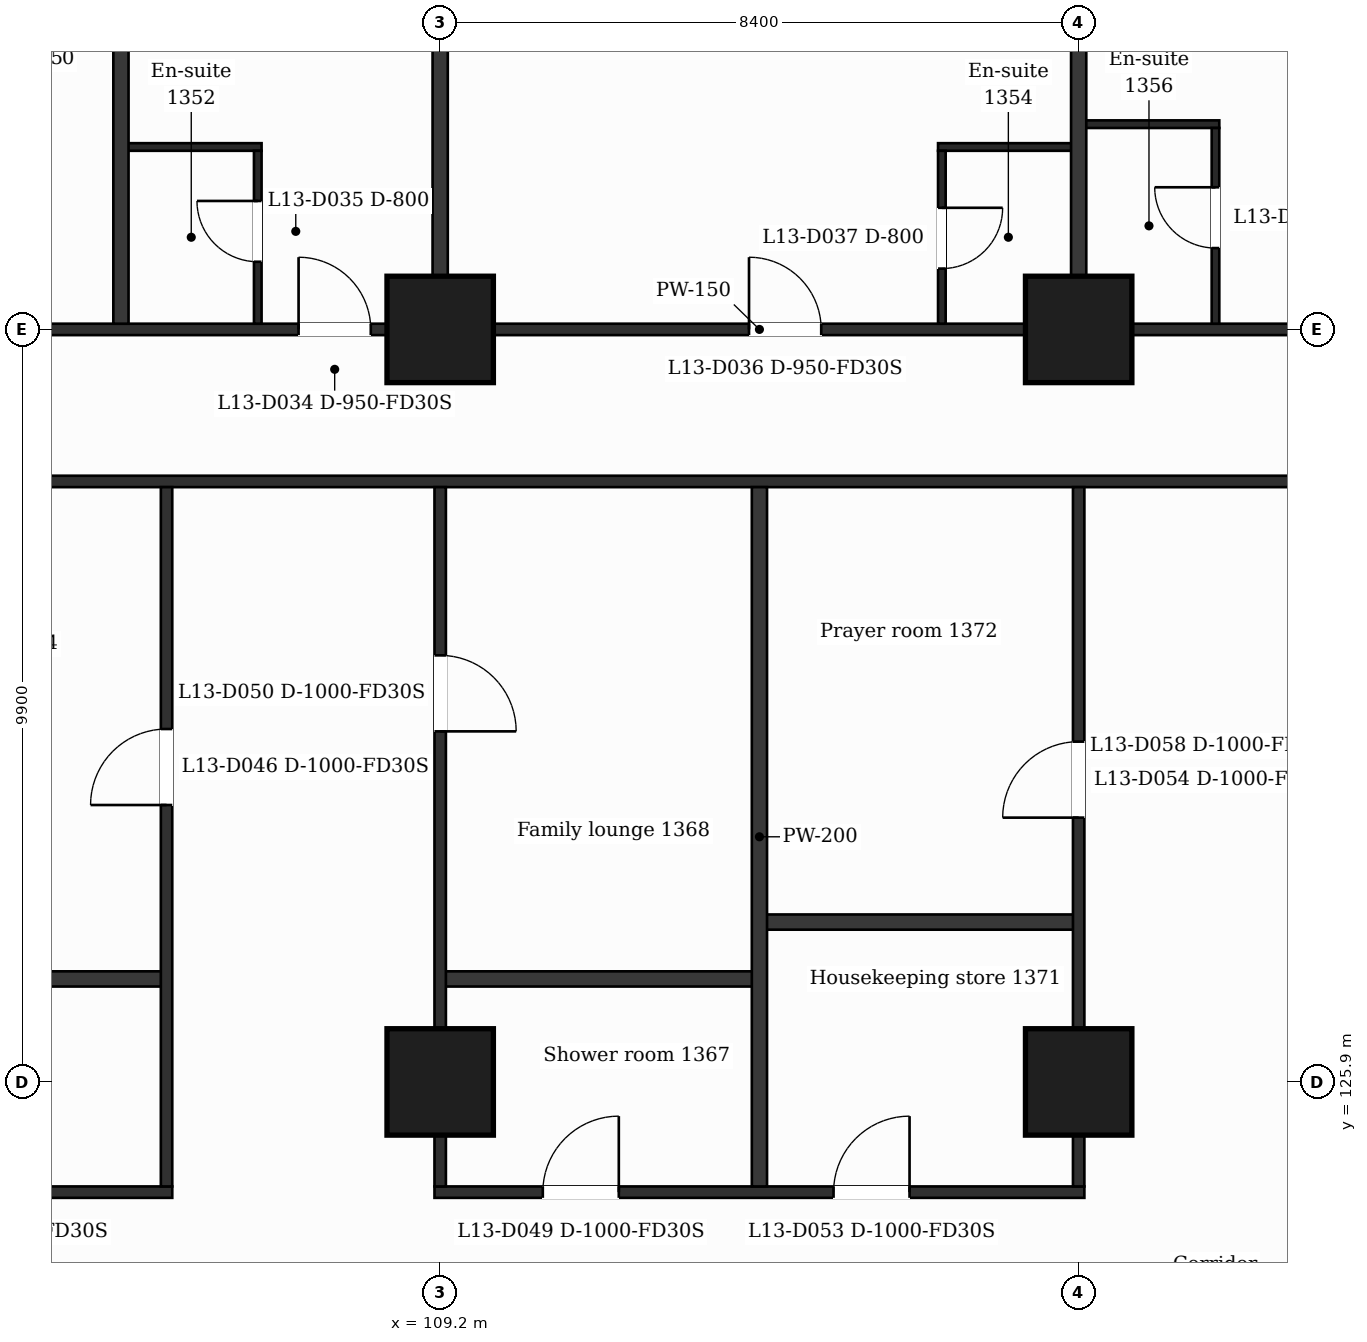
"""IFC4 building model, lengths in metres.
Left out: names, types, materials, properties, quantities, classifications, styles, units other than length and angle.
Written with IfcOpenShell. Run it as: python <this file> out.ifc"""

import sys

from ifc_helpers import new_model, si_unit, direction, frame, frame_2d, origin, origin_2d, place, context, subcontext, project, spatial, rectangle, extrude, element, fill, save


model = new_model("IFC4")
c1 = context("Model", 3, precision=1e-05, world=origin(), true_north=direction((0.0, 1.0)))
c2 = subcontext(c1, "Body", "Model", "MODEL_VIEW")
j1 = project(units=[si_unit("LENGTHUNIT", "METRE"), si_unit("PLANEANGLEUNIT", "RADIAN")], contexts=[c1])
p1 = place(None, origin())
s1 = spatial("IfcSite", under=j1, at=p1, CompositionType="ELEMENT")
p2 = place(p1, origin())
s2 = spatial("IfcBuilding", under=s1, at=p2, CompositionType="ELEMENT")
p3 = place(p2, frame((0.0, 0.0, 63.5)))
s3 = spatial("IfcBuildingStorey", under=s2, at=p3, CompositionType="ELEMENT", Elevation=63.5)
for number, where, z_axis, x_axis in (
    (1, (109.2, 125.9, 0.0), (0.0, 0.0, 1.0), (1.0, 0.0, 0.0)),
    (2, (117.6, 125.9, 0.0), (0.0, 0.0, 1.0), (1.0, 0.0, 0.0)),
    (3, (109.2, 135.8, 0.0), (0.0, 0.0, 1.0), (1.0, 0.0, 0.0)),
    (4, (117.6, 135.8, 0.0), (0.0, 0.0, 1.0), (1.0, 0.0, 0.0)),
):
    element("IfcColumn", number, at=place(p3, frame(where, z_axis=z_axis, x_axis=x_axis)), inside=s3, PredefinedType="COLUMN", context=c2, shape_type="SweptSolid", body=[
        extrude(rectangle(XDim=1.4, YDim=1.4, at=origin_2d()), origin(), (0.0, 0.0, 1.0), 3.5),
    ])
p4 = place(p3, frame((100.8, 124.45, 0.0), z_axis=(0.0, 0.0, 1.0), x_axis=(1.0, 0.0, 0.0)))
e5 = element("IfcWall", 5, at=p4, inside=s3, PredefinedType="PARTITIONING", context=c2, shape_type="SweptSolid", body=[
    extrude(rectangle(XDim=4.875, YDim=0.15, at=frame_2d((2.438, 0.0))), origin(), (0.0, 0.0, 1.0), 3.18),
])
p5 = place(p4, frame((1.9, 0.0, 0.0)))
e6 = element("IfcOpeningElement", 6, at=p5, cuts=e5, PredefinedType="OPENING", context=c2, shape_type="SweptSolid", body=[
    extrude(rectangle(XDim=1.0, YDim=2.1, at=frame_2d((0.5, 1.05))), frame((0.0, 0.085, 0.0), z_axis=(0.0, -1.0, 0.0), x_axis=(1.0, 0.0, 0.0)), (0.0, 0.0, 1.0), 0.17),
])
p6 = place(p3, frame((109.125, 124.45, 0.0), z_axis=(0.0, 0.0, 1.0), x_axis=(1.0, 0.0, 0.0)))
e7 = element("IfcWall", 7, at=p6, inside=s3, PredefinedType="PARTITIONING", context=c2, shape_type="SweptSolid", body=[
    extrude(rectangle(XDim=8.55, YDim=0.15, at=frame_2d((4.275, 0.0))), origin(), (0.0, 0.0, 1.0), 3.18),
])
p7 = place(p6, frame((1.425, 0.0, 0.0)))
e8 = element("IfcOpeningElement", 8, at=p7, cuts=e7, PredefinedType="OPENING", context=c2, shape_type="SweptSolid", body=[
    extrude(rectangle(XDim=1.0, YDim=2.1, at=frame_2d((0.5, 1.05))), frame((0.0, 0.085, 0.0), z_axis=(0.0, -1.0, 0.0), x_axis=(1.0, 0.0, 0.0)), (0.0, 0.0, 1.0), 0.17),
])
p8 = place(p6, frame((5.25, 0.0, 0.0)))
e9 = element("IfcOpeningElement", 9, at=p8, cuts=e7, PredefinedType="OPENING", context=c2, shape_type="SweptSolid", body=[
    extrude(rectangle(XDim=1.0, YDim=2.1, at=frame_2d((0.5, 1.05))), frame((0.0, 0.085, 0.0), z_axis=(0.0, -1.0, 0.0), x_axis=(1.0, 0.0, 0.0)), (0.0, 0.0, 1.0), 0.17),
])
p9 = place(p3, frame((100.8, 127.255, 0.0), z_axis=(0.0, 0.0, 1.0), x_axis=(1.0, 0.0, 0.0)))
e10 = element("IfcWall", 10, at=p9, inside=s3, PredefinedType="PARTITIONING", context=c2, shape_type="SweptSolid", body=[
    extrude(rectangle(XDim=4.8, YDim=0.2, at=frame_2d((2.4, 0.0))), origin(), (0.0, 0.0, 1.0), 3.18),
])
p10 = place(p3, frame((109.2, 127.255, 0.0), z_axis=(0.0, 0.0, 1.0), x_axis=(1.0, 0.0, 0.0)))
e11 = element("IfcWall", 11, at=p10, inside=s3, PredefinedType="PARTITIONING", context=c2, shape_type="SweptSolid", body=[
    extrude(rectangle(XDim=4.2, YDim=0.2, at=frame_2d((2.1, 0.0))), origin(), (0.0, 0.0, 1.0), 3.18),
])
p11 = place(p3, frame((113.4, 128.003, 0.0), z_axis=(0.0, 0.0, 1.0), x_axis=(1.0, 0.0, 0.0)))
e12 = element("IfcWall", 12, at=p11, inside=s3, PredefinedType="PARTITIONING", context=c2, shape_type="SweptSolid", body=[
    extrude(rectangle(XDim=4.2, YDim=0.2, at=frame_2d((2.1, 0.0))), origin(), (0.0, 0.0, 1.0), 3.18),
])
p12 = place(p3, frame((100.725, 133.8, 0.0), z_axis=(0.0, 0.0, 1.0), x_axis=(1.0, 0.0, 0.0)))
e13 = element("IfcWall", 13, at=p12, inside=s3, PredefinedType="PARTITIONING", context=c2, shape_type="SweptSolid", body=[
    extrude(rectangle(XDim=25.35, YDim=0.15, at=frame_2d((12.675, 0.0))), origin(), (0.0, 0.0, 1.0), 3.18),
])
p13 = place(p3, frame((90.895, 135.8, 0.0), z_axis=(0.0, 0.0, 1.0), x_axis=(1.0, 0.0, 0.0)))
e14 = element("IfcWall", 14, at=p13, inside=s3, PredefinedType="PARTITIONING", context=c2, shape_type="SweptSolid", body=[
    extrude(rectangle(XDim=45.011, YDim=0.15, at=frame_2d((22.505, 0.0))), origin(), (0.0, 0.0, 1.0), 3.18),
])
p14 = place(p13, frame((7.675, 0.0, 0.0)))
e15 = element("IfcOpeningElement", 15, at=p14, cuts=e14, PredefinedType="OPENING", context=c2, shape_type="SweptSolid", body=[
    extrude(rectangle(XDim=1.0, YDim=2.1, at=frame_2d((0.5, 1.05))), frame((0.0, 0.085, 0.0), z_axis=(0.0, -1.0, 0.0), x_axis=(1.0, 0.0, 0.0)), (0.0, 0.0, 1.0), 0.17),
])
p15 = place(p13, frame((10.892, 0.0, 0.0)))
e16 = element("IfcOpeningElement", 16, at=p15, cuts=e14, PredefinedType="OPENING", context=c2, shape_type="SweptSolid", body=[
    extrude(rectangle(XDim=0.95, YDim=2.1, at=frame_2d((0.475, 1.05))), frame((0.0, 0.085, 0.0), z_axis=(0.0, -1.0, 0.0), x_axis=(1.0, 0.0, 0.0)), (0.0, 0.0, 1.0), 0.17),
])
p16 = place(p13, frame((16.442, 0.0, 0.0)))
e17 = element("IfcOpeningElement", 17, at=p16, cuts=e14, PredefinedType="OPENING", context=c2, shape_type="SweptSolid", body=[
    extrude(rectangle(XDim=0.95, YDim=2.1, at=frame_2d((0.475, 1.05))), frame((0.0, 0.085, 0.0), z_axis=(0.0, -1.0, 0.0), x_axis=(1.0, 0.0, 0.0)), (0.0, 0.0, 1.0), 0.17),
])
p17 = place(p13, frame((22.368, 0.0, 0.0)))
e18 = element("IfcOpeningElement", 18, at=p17, cuts=e14, PredefinedType="OPENING", context=c2, shape_type="SweptSolid", body=[
    extrude(rectangle(XDim=0.95, YDim=2.1, at=frame_2d((0.475, 1.05))), frame((0.0, 0.085, 0.0), z_axis=(0.0, -1.0, 0.0), x_axis=(1.0, 0.0, 0.0)), (0.0, 0.0, 1.0), 0.17),
])
p18 = place(p13, frame((31.825, 0.0, 0.0)))
e19 = element("IfcOpeningElement", 19, at=p18, cuts=e14, PredefinedType="OPENING", context=c2, shape_type="SweptSolid", body=[
    extrude(rectangle(XDim=0.95, YDim=2.1, at=frame_2d((0.475, 1.05))), frame((0.0, 0.085, 0.0), z_axis=(0.0, -1.0, 0.0), x_axis=(1.0, 0.0, 0.0)), (0.0, 0.0, 1.0), 0.17),
])
p19 = place(p13, frame((36.775, 0.0, 0.0)))
e20 = element("IfcOpeningElement", 20, at=p19, cuts=e14, PredefinedType="OPENING", context=c2, shape_type="SweptSolid", body=[
    extrude(rectangle(XDim=1.0, YDim=2.1, at=frame_2d((0.5, 1.05))), frame((0.0, 0.085, 0.0), z_axis=(0.0, -1.0, 0.0), x_axis=(1.0, 0.0, 0.0)), (0.0, 0.0, 1.0), 0.17),
])
for number, where, z_axis, x_axis in (
    (21, (105.0, 138.2, 0.0), (0.0, 0.0, 1.0), (1.0, 0.0, 0.0)),
    (22, (115.75, 138.2, 0.0), (0.0, 0.0, 1.0), (1.0, 0.0, 0.0)),
):
    element("IfcWall", number, at=place(p3, frame(where, z_axis=z_axis, x_axis=x_axis)), inside=s3, PredefinedType="PARTITIONING", context=c2, shape_type="SweptSolid", body=[
        extrude(rectangle(XDim=1.85, YDim=0.1, at=frame_2d((0.925, 0.0))), origin(), (0.0, 0.0, 1.0), 3.18),
    ])
p20 = place(p3, frame((117.6, 138.5, 0.0), z_axis=(0.0, 0.0, 1.0), x_axis=(1.0, 0.0, 0.0)))
e23 = element("IfcWall", 23, at=p20, inside=s3, PredefinedType="PARTITIONING", context=c2, shape_type="SweptSolid", body=[
    extrude(rectangle(XDim=1.85, YDim=0.1, at=frame_2d((0.925, 0.0))), origin(), (0.0, 0.0, 1.0), 3.18),
])
p21 = place(p3, frame((105.0, 135.875, 0.0), z_axis=(0.0, 0.0, 1.0), x_axis=(0.0, 1.0, 0.0)))
e24 = element("IfcWall", 24, at=p21, inside=s3, PredefinedType="PARTITIONING", context=c2, shape_type="SweptSolid", body=[
    extrude(rectangle(XDim=7.135, YDim=0.2, at=frame_2d((3.567, 0.0))), origin(), (0.0, 0.0, 1.0), 3.18),
])
p22 = place(p3, frame((105.6, 124.525, 0.0), z_axis=(0.0, 0.0, 1.0), x_axis=(0.0, 1.0, 0.0)))
e25 = element("IfcWall", 25, at=p22, inside=s3, PredefinedType="PARTITIONING", context=c2, shape_type="SweptSolid", body=[
    extrude(rectangle(XDim=9.2, YDim=0.15, at=frame_2d((4.6, 0.0))), origin(), (0.0, 0.0, 1.0), 3.18),
])
p23 = place(p22, frame((5.018, 0.0, 0.0)))
e26 = element("IfcOpeningElement", 26, at=p23, cuts=e25, PredefinedType="OPENING", context=c2, shape_type="SweptSolid", body=[
    extrude(rectangle(XDim=1.0, YDim=2.1, at=frame_2d((0.5, 1.05))), frame((0.0, 0.085, 0.0), z_axis=(0.0, -1.0, 0.0), x_axis=(1.0, 0.0, 0.0)), (0.0, 0.0, 1.0), 0.17),
])
p24 = place(p3, frame((106.8, 135.875, 0.0), z_axis=(0.0, 0.0, 1.0), x_axis=(0.0, 1.0, 0.0)))
e27 = element("IfcWall", 27, at=p24, inside=s3, PredefinedType="PARTITIONING", context=c2, shape_type="SweptSolid", body=[
    extrude(rectangle(XDim=2.275, YDim=0.1, at=frame_2d((1.137, 0.0))), origin(), (0.0, 0.0, 1.0), 3.18),
])
p25 = place(p24, frame((0.815, 0.0, 0.0)))
e28 = element("IfcOpeningElement", 28, at=p25, cuts=e27, PredefinedType="OPENING", context=c2, shape_type="SweptSolid", body=[
    extrude(rectangle(XDim=0.8, YDim=2.1, at=frame_2d((0.4, 1.05))), frame((0.0, 0.06, 0.0), z_axis=(0.0, -1.0, 0.0), x_axis=(1.0, 0.0, 0.0)), (0.0, 0.0, 1.0), 0.12),
])
p26 = place(p3, frame((109.2, 135.875, 0.0), z_axis=(0.0, 0.0, 1.0), x_axis=(0.0, 1.0, 0.0)))
e29 = element("IfcWall", 29, at=p26, inside=s3, PredefinedType="PARTITIONING", context=c2, shape_type="SweptSolid", body=[
    extrude(rectangle(XDim=7.135, YDim=0.2, at=frame_2d((3.567, 0.0))), origin(), (0.0, 0.0, 1.0), 3.18),
])
p27 = place(p3, frame((109.2, 124.525, 0.0), z_axis=(0.0, 0.0, 1.0), x_axis=(0.0, 1.0, 0.0)))
e30 = element("IfcWall", 30, at=p27, inside=s3, PredefinedType="PARTITIONING", context=c2, shape_type="SweptSolid", body=[
    extrude(rectangle(XDim=9.2, YDim=0.15, at=frame_2d((4.6, 0.0))), origin(), (0.0, 0.0, 1.0), 3.18),
])
p28 = place(p27, frame((5.987, 0.0, 0.0)))
e31 = element("IfcOpeningElement", 31, at=p28, cuts=e30, PredefinedType="OPENING", context=c2, shape_type="SweptSolid", body=[
    extrude(rectangle(XDim=1.0, YDim=2.1, at=frame_2d((0.5, 1.05))), frame((0.0, 0.085, 0.0), z_axis=(0.0, -1.0, 0.0), x_axis=(1.0, 0.0, 0.0)), (0.0, 0.0, 1.0), 0.17),
])
p29 = place(p3, frame((113.4, 124.525, 0.0), z_axis=(0.0, 0.0, 1.0), x_axis=(0.0, 1.0, 0.0)))
e32 = element("IfcWall", 32, at=p29, inside=s3, PredefinedType="PARTITIONING", context=c2, shape_type="SweptSolid", body=[
    extrude(rectangle(XDim=9.2, YDim=0.2, at=frame_2d((4.6, 0.0))), origin(), (0.0, 0.0, 1.0), 3.18),
])
p30 = place(p3, frame((115.8, 135.875, 0.0), z_axis=(0.0, 0.0, 1.0), x_axis=(0.0, 1.0, 0.0)))
e33 = element("IfcWall", 33, at=p30, inside=s3, PredefinedType="PARTITIONING", context=c2, shape_type="SweptSolid", body=[
    extrude(rectangle(XDim=2.275, YDim=0.1, at=frame_2d((1.137, 0.0))), origin(), (0.0, 0.0, 1.0), 3.18),
])
p31 = place(p30, frame((0.725, 0.0, 0.0)))
e34 = element("IfcOpeningElement", 34, at=p31, cuts=e33, PredefinedType="OPENING", context=c2, shape_type="SweptSolid", body=[
    extrude(rectangle(XDim=0.8, YDim=2.1, at=frame_2d((0.4, 1.05))), frame((0.0, 0.06, 0.0), z_axis=(0.0, -1.0, 0.0), x_axis=(1.0, 0.0, 0.0)), (0.0, 0.0, 1.0), 0.12),
])
p32 = place(p3, frame((117.6, 135.875, 0.0), z_axis=(0.0, 0.0, 1.0), x_axis=(0.0, 1.0, 0.0)))
e35 = element("IfcWall", 35, at=p32, inside=s3, PredefinedType="PARTITIONING", context=c2, shape_type="SweptSolid", body=[
    extrude(rectangle(XDim=7.135, YDim=0.2, at=frame_2d((3.567, 0.0))), origin(), (0.0, 0.0, 1.0), 3.18),
])
p33 = place(p3, frame((117.6, 124.525, 0.0), z_axis=(0.0, 0.0, 1.0), x_axis=(0.0, 1.0, 0.0)))
e36 = element("IfcWall", 36, at=p33, inside=s3, PredefinedType="PARTITIONING", context=c2, shape_type="SweptSolid", body=[
    extrude(rectangle(XDim=9.2, YDim=0.15, at=frame_2d((4.6, 0.0))), origin(), (0.0, 0.0, 1.0), 3.18),
])
p34 = place(p33, frame((4.852, 0.0, 0.0)))
e37 = element("IfcOpeningElement", 37, at=p34, cuts=e36, PredefinedType="OPENING", context=c2, shape_type="SweptSolid", body=[
    extrude(rectangle(XDim=1.0, YDim=2.1, at=frame_2d((0.5, 1.05))), frame((0.0, 0.085, 0.0), z_axis=(0.0, -1.0, 0.0), x_axis=(1.0, 0.0, 0.0)), (0.0, 0.0, 1.0), 0.17),
])
p35 = place(p3, frame((119.4, 135.875, 0.0), z_axis=(0.0, 0.0, 1.0), x_axis=(0.0, 1.0, 0.0)))
e38 = element("IfcWall", 38, at=p35, inside=s3, PredefinedType="PARTITIONING", context=c2, shape_type="SweptSolid", body=[
    extrude(rectangle(XDim=2.575, YDim=0.1, at=frame_2d((1.288, 0.0))), origin(), (0.0, 0.0, 1.0), 3.18),
])
p36 = place(p35, frame((0.995, 0.0, 0.0)))
e39 = element("IfcOpeningElement", 39, at=p36, cuts=e38, PredefinedType="OPENING", context=c2, shape_type="SweptSolid", body=[
    extrude(rectangle(XDim=0.8, YDim=2.1, at=frame_2d((0.4, 1.05))), frame((0.0, 0.06, 0.0), z_axis=(0.0, -1.0, 0.0), x_axis=(1.0, 0.0, 0.0)), (0.0, 0.0, 1.0), 0.12),
])
p37 = place(p16, origin())
e40 = element("IfcDoor", 40, at=p37, inside=s3, OperationType="SINGLE_SWING_LEFT", PredefinedType="DOOR", context=c2, shape_type="SweptSolid", body=[
    extrude(rectangle(XDim=0.95, YDim=2.1, at=frame_2d((0.475, 1.05))), frame((0.0, 0.025, 0.0), z_axis=(0.0, -1.0, 0.0), x_axis=(1.0, 0.0, 0.0)), (0.0, 0.0, 1.0), 0.05),
])
fill(e17, e40)
p38 = place(p25, origin())
e41 = element("IfcDoor", 41, at=p38, inside=s3, OperationType="SINGLE_SWING_RIGHT", PredefinedType="DOOR", context=c2, shape_type="SweptSolid", body=[
    extrude(rectangle(XDim=0.8, YDim=2.1, at=frame_2d((0.4, 1.05))), frame((0.0, 0.025, 0.0), z_axis=(0.0, -1.0, 0.0), x_axis=(1.0, 0.0, 0.0)), (0.0, 0.0, 1.0), 0.05),
])
fill(e28, e41)
p39 = place(p17, origin())
e42 = element("IfcDoor", 42, at=p39, inside=s3, OperationType="SINGLE_SWING_LEFT", PredefinedType="DOOR", context=c2, shape_type="SweptSolid", body=[
    extrude(rectangle(XDim=0.95, YDim=2.1, at=frame_2d((0.475, 1.05))), frame((0.0, 0.025, 0.0), z_axis=(0.0, -1.0, 0.0), x_axis=(1.0, 0.0, 0.0)), (0.0, 0.0, 1.0), 0.05),
])
fill(e18, e42)
p40 = place(p31, origin())
e43 = element("IfcDoor", 43, at=p40, inside=s3, OperationType="SINGLE_SWING_RIGHT", PredefinedType="DOOR", context=c2, shape_type="SweptSolid", body=[
    extrude(rectangle(XDim=0.8, YDim=2.1, at=frame_2d((0.4, 1.05))), frame((0.0, 0.025, 0.0), z_axis=(0.0, -1.0, 0.0), x_axis=(1.0, 0.0, 0.0)), (0.0, 0.0, 1.0), 0.05),
])
fill(e34, e43)
p41 = place(p36, origin())
e44 = element("IfcDoor", 44, at=p41, inside=s3, OperationType="SINGLE_SWING_RIGHT", PredefinedType="DOOR", context=c2, shape_type="SweptSolid", body=[
    extrude(rectangle(XDim=0.8, YDim=2.1, at=frame_2d((0.4, 1.05))), frame((0.0, 0.025, 0.0), z_axis=(0.0, -1.0, 0.0), x_axis=(1.0, 0.0, 0.0)), (0.0, 0.0, 1.0), 0.05),
])
fill(e39, e44)
p42 = place(p23, origin())
e45 = element("IfcDoor", 45, at=p42, inside=s3, OperationType="SINGLE_SWING_LEFT", PredefinedType="DOOR", context=c2, shape_type="SweptSolid", body=[
    extrude(rectangle(XDim=1.0, YDim=2.1, at=frame_2d((0.5, 1.05))), frame((0.0, 0.025, 0.0), z_axis=(0.0, -1.0, 0.0), x_axis=(1.0, 0.0, 0.0)), (0.0, 0.0, 1.0), 0.05),
])
fill(e26, e45)
p43 = place(p7, origin())
e46 = element("IfcDoor", 46, at=p43, inside=s3, OperationType="SINGLE_SWING_RIGHT", PredefinedType="DOOR", context=c2, shape_type="SweptSolid", body=[
    extrude(rectangle(XDim=1.0, YDim=2.1, at=frame_2d((0.5, 1.05))), frame((0.0, 0.025, 0.0), z_axis=(0.0, -1.0, 0.0), x_axis=(1.0, 0.0, 0.0)), (0.0, 0.0, 1.0), 0.05),
])
fill(e8, e46)
p44 = place(p28, origin())
e47 = element("IfcDoor", 47, at=p44, inside=s3, OperationType="SINGLE_SWING_LEFT", PredefinedType="DOOR", context=c2, shape_type="SweptSolid", body=[
    extrude(rectangle(XDim=1.0, YDim=2.1, at=frame_2d((0.5, 1.05))), frame((0.0, 0.025, 0.0), z_axis=(0.0, -1.0, 0.0), x_axis=(1.0, 0.0, 0.0)), (0.0, 0.0, 1.0), 0.05),
])
fill(e31, e47)
p45 = place(p8, origin())
e48 = element("IfcDoor", 48, at=p45, inside=s3, OperationType="SINGLE_SWING_RIGHT", PredefinedType="DOOR", context=c2, shape_type="SweptSolid", body=[
    extrude(rectangle(XDim=1.0, YDim=2.1, at=frame_2d((0.5, 1.05))), frame((0.0, 0.025, 0.0), z_axis=(0.0, -1.0, 0.0), x_axis=(1.0, 0.0, 0.0)), (0.0, 0.0, 1.0), 0.05),
])
fill(e9, e48)
p46 = place(p34, origin())
e49 = element("IfcDoor", 49, at=p46, inside=s3, OperationType="SINGLE_SWING_LEFT", PredefinedType="DOOR", context=c2, shape_type="SweptSolid", body=[
    extrude(rectangle(XDim=1.0, YDim=2.1, at=frame_2d((0.5, 1.05))), frame((0.0, 0.025, 0.0), z_axis=(0.0, -1.0, 0.0), x_axis=(1.0, 0.0, 0.0)), (0.0, 0.0, 1.0), 0.05),
])
fill(e37, e49)
save(model, sys.argv[1])
